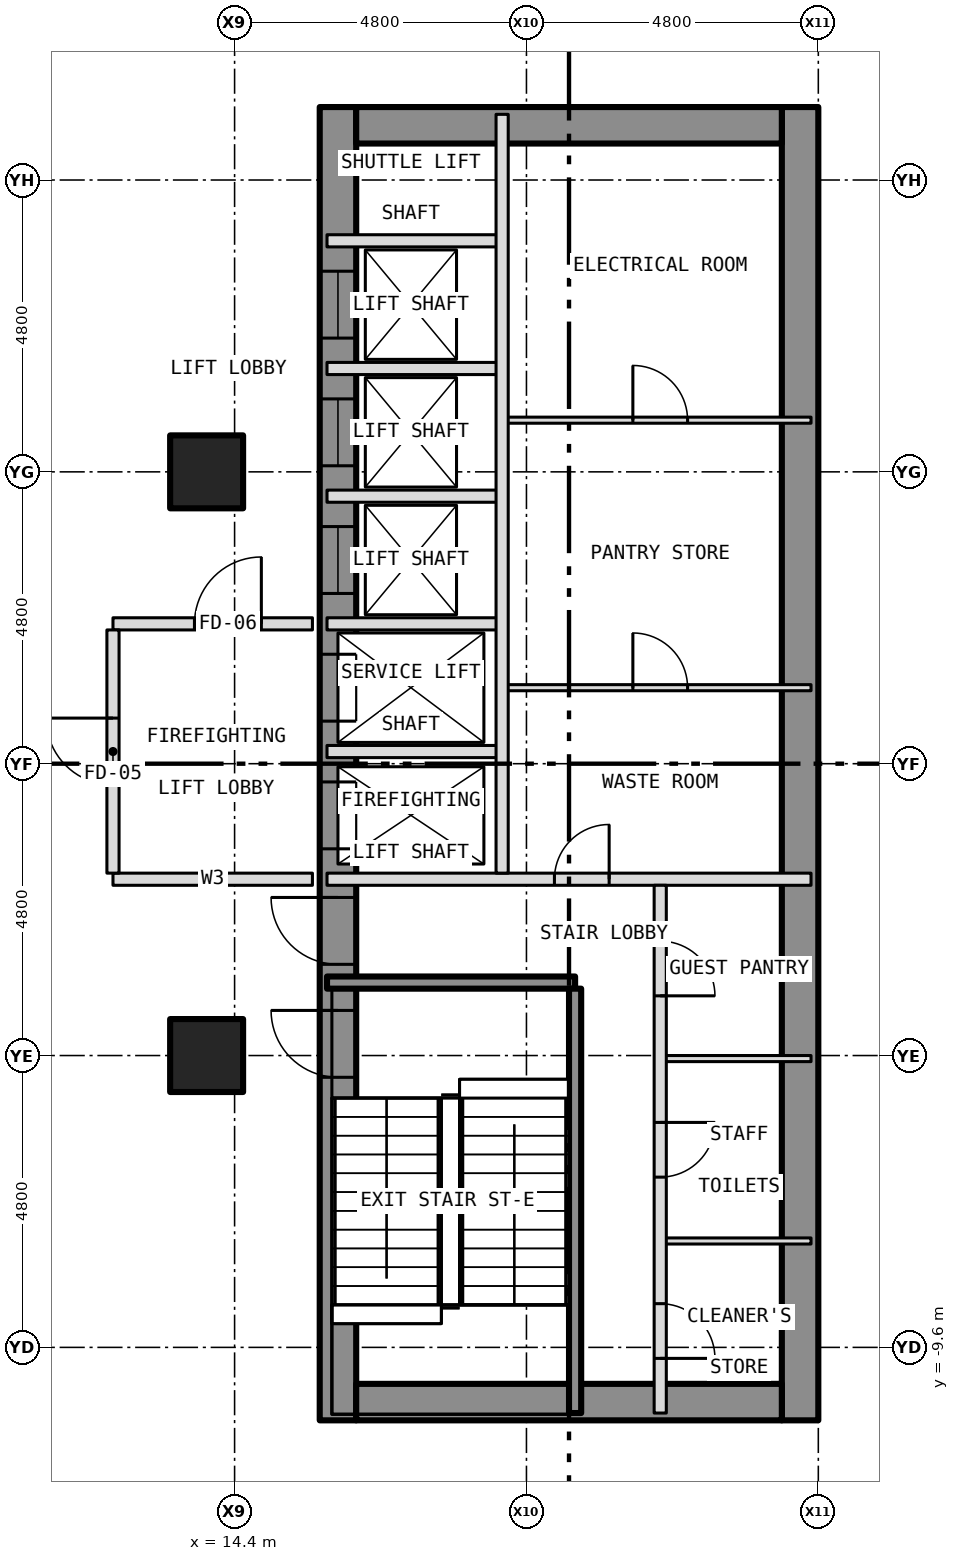
"""IFC4 building model, lengths in metres.
Left out: names, types, materials, properties, quantities, classifications, styles, units other than length and angle.
Written with IfcOpenShell. Run it as: python <this file> out.ifc"""

import sys

from ifc_helpers import new_model, si_unit, direction, frame, frame_2d, origin, origin_2d, place, context, subcontext, project, spatial, rectangle, hollow_rectangle, extrude, element, fill, save


model = new_model("IFC4")
c1 = context("Model", 3, precision=1e-05, world=origin(), true_north=direction((0.0, 1.0)))
c2 = subcontext(c1, "Body", "Model", "MODEL_VIEW")
j1 = project(units=[si_unit("LENGTHUNIT", "METRE"), si_unit("PLANEANGLEUNIT", "RADIAN")], contexts=[c1])
p1 = place(None, origin())
s1 = spatial("IfcSite", under=j1, at=p1, CompositionType="ELEMENT")
p2 = place(p1, origin())
s2 = spatial("IfcBuilding", under=s1, at=p2, CompositionType="ELEMENT")
p3 = place(p2, frame((0.0, 0.0, 7.5)))
s3 = spatial("IfcBuildingStorey", under=s2, at=p3, CompositionType="ELEMENT", Elevation=7.5)
for number, where, z_axis, x_axis in (
    (1, (13.94, -4.8, -0.25), (0.0, 0.0, 1.0), (1.0, 0.0, 0.0)),
    (2, (13.94, 4.8, -0.25), (0.0, 0.0, 1.0), (1.0, 0.0, 0.0)),
):
    element("IfcColumn", number, at=place(p3, frame(where, z_axis=z_axis, x_axis=x_axis)), inside=s3, PredefinedType="COLUMN", context=c2, shape_type="SweptSolid", body=[
        extrude(hollow_rectangle(XDim=1.2, YDim=1.2, WallThickness=0.07, at=origin_2d()), origin(), (0.0, 0.0, 1.0), 8.05),
    ])
p4 = place(p3, frame((16.1, -10.8, 0.0), z_axis=(0.0, 0.0, 1.0), x_axis=(0.0, 1.0, 0.0)))
e3 = element("IfcWall", 3, at=p4, inside=s3, PredefinedType="SHEAR", context=c2, shape_type="SweptSolid", body=[
    extrude(rectangle(XDim=21.6, YDim=0.6, at=frame_2d((10.8, 0.0))), origin(), (0.0, 0.0, 1.0), 7.7),
])
p5 = place(p4, frame((9.4, 0.0, 0.0)))
e4 = element("IfcOpeningElement", 4, at=p5, cuts=e3, PredefinedType="OPENING", context=c2, shape_type="SweptSolid", body=[
    extrude(rectangle(XDim=1.1, YDim=2.1, at=frame_2d((0.55, 1.05))), frame((0.0, 0.312, 0.0), z_axis=(0.0, -1.0, 0.0), x_axis=(1.0, 0.0, 0.0)), (0.0, 0.0, 1.0), 0.624),
])
p6 = place(p4, frame((11.5, 0.0, 0.0)))
e5 = element("IfcOpeningElement", 5, at=p6, cuts=e3, PredefinedType="OPENING", context=c2, shape_type="SweptSolid", body=[
    extrude(rectangle(XDim=1.1, YDim=2.1, at=frame_2d((0.55, 1.05))), frame((0.0, 0.312, 0.0), z_axis=(0.0, -1.0, 0.0), x_axis=(1.0, 0.0, 0.0)), (0.0, 0.0, 1.0), 0.624),
])
p7 = place(p4, frame((13.6, 0.0, 0.0)))
e6 = element("IfcOpeningElement", 6, at=p7, cuts=e3, PredefinedType="OPENING", context=c2, shape_type="SweptSolid", body=[
    extrude(rectangle(XDim=1.1, YDim=2.1, at=frame_2d((0.55, 1.05))), frame((0.0, 0.312, 0.0), z_axis=(0.0, -1.0, 0.0), x_axis=(1.0, 0.0, 0.0)), (0.0, 0.0, 1.0), 0.624),
])
p8 = place(p4, frame((15.7, 0.0, 0.0)))
e7 = element("IfcOpeningElement", 7, at=p8, cuts=e3, PredefinedType="OPENING", context=c2, shape_type="SweptSolid", body=[
    extrude(rectangle(XDim=1.1, YDim=2.1, at=frame_2d((0.55, 1.05))), frame((0.0, 0.312, 0.0), z_axis=(0.0, -1.0, 0.0), x_axis=(1.0, 0.0, 0.0)), (0.0, 0.0, 1.0), 0.624),
])
p9 = place(p4, frame((17.8, 0.0, 0.0)))
e8 = element("IfcOpeningElement", 8, at=p9, cuts=e3, PredefinedType="OPENING", context=c2, shape_type="SweptSolid", body=[
    extrude(rectangle(XDim=1.1, YDim=2.1, at=frame_2d((0.55, 1.05))), frame((0.0, 0.312, 0.0), z_axis=(0.0, -1.0, 0.0), x_axis=(1.0, 0.0, 0.0)), (0.0, 0.0, 1.0), 0.624),
])
p10 = place(p4, frame((5.642, 0.0, 0.0)))
e9 = element("IfcOpeningElement", 9, at=p10, cuts=e3, PredefinedType="OPENING", context=c2, shape_type="SweptSolid", body=[
    extrude(rectangle(XDim=1.1, YDim=2.1, at=frame_2d((0.55, 1.05))), frame((0.0, 0.312, 0.0), z_axis=(0.0, -1.0, 0.0), x_axis=(1.0, 0.0, 0.0)), (0.0, 0.0, 1.0), 0.624),
])
p11 = place(p4, frame((7.5, 0.0, 0.0)))
e10 = element("IfcOpeningElement", 10, at=p11, cuts=e3, PredefinedType="OPENING", context=c2, shape_type="SweptSolid", body=[
    extrude(rectangle(XDim=1.1, YDim=2.1, at=frame_2d((0.55, 1.05))), frame((0.0, 0.312, 0.0), z_axis=(0.0, -1.0, 0.0), x_axis=(1.0, 0.0, 0.0)), (0.0, 0.0, 1.0), 0.624),
])
p12 = place(p3, frame((23.7, -10.8, 0.0), z_axis=(0.0, 0.0, 1.0), x_axis=(0.0, 1.0, 0.0)))
e11 = element("IfcWall", 11, at=p12, inside=s3, PredefinedType="SHEAR", context=c2, shape_type="SweptSolid", body=[
    extrude(rectangle(XDim=21.6, YDim=0.6, at=frame_2d((10.8, 0.0))), origin(), (0.0, 0.0, 1.0), 7.7),
])
for number, where, z_axis, x_axis in (
    (12, (16.4, 10.5, 0.0), (0.0, 0.0, 1.0), (1.0, 0.0, 0.0)),
    (13, (16.4, -10.5, 0.0), (0.0, 0.0, 1.0), (1.0, 0.0, 0.0)),
):
    element("IfcWall", number, at=place(p3, frame(where, z_axis=z_axis, x_axis=x_axis)), inside=s3, PredefinedType="SHEAR", context=c2, shape_type="SweptSolid", body=[
        extrude(rectangle(XDim=7.0, YDim=0.6, at=frame_2d((3.5, 0.0))), origin(), (0.0, 0.0, 1.0), 7.7),
    ])
for number, where, z_axis, x_axis in (
    (14, (21.4, -7.85, 0.0), (0.0, 0.0, 1.0), (1.0, 0.0, 0.0)),
    (15, (21.4, -4.85, 0.0), (0.0, 0.0, 1.0), (1.0, 0.0, 0.0)),
):
    element("IfcWall", number, at=place(p3, frame(where, z_axis=z_axis, x_axis=x_axis)), inside=s3, PredefinedType="PARTITIONING", context=c2, shape_type="SweptSolid", body=[
        extrude(rectangle(XDim=2.48, YDim=0.1, at=frame_2d((1.24, 0.0))), origin(), (0.0, 0.0, 1.0), 7.7),
    ])
p13 = place(p3, frame((15.92, -3.6, 0.0), z_axis=(0.0, 0.0, 1.0), x_axis=(1.0, 0.0, 0.0)))
e16 = element("IfcWall", 16, at=p13, inside=s3, PredefinedType="SHEAR", context=c2, shape_type="SweptSolid", body=[
    extrude(rectangle(XDim=4.08, YDim=0.2, at=frame_2d((2.04, 0.0))), origin(), (0.0, 0.0, 1.0), 7.7),
])
p14 = place(p3, frame((12.4, -1.9, 0.0), z_axis=(0.0, 0.0, 1.0), x_axis=(1.0, 0.0, 0.0)))
e17 = element("IfcWall", 17, at=p14, inside=s3, PredefinedType="PARTITIONING", context=c2, shape_type="SweptSolid", body=[
    extrude(rectangle(XDim=3.28, YDim=0.2, at=frame_2d((1.64, 0.0))), origin(), (0.0, 0.0, 1.0), 7.8),
])
p15 = place(p3, frame((15.92, -1.9, 0.0), z_axis=(0.0, 0.0, 1.0), x_axis=(1.0, 0.0, 0.0)))
e18 = element("IfcWall", 18, at=p15, inside=s3, PredefinedType="PARTITIONING", context=c2, shape_type="SweptSolid", body=[
    extrude(rectangle(XDim=7.96, YDim=0.2, at=frame_2d((3.98, 0.0))), origin(), (0.0, 0.0, 1.0), 7.7),
])
p16 = place(p15, frame((3.74, 0.0, 0.0)))
e19 = element("IfcOpeningElement", 19, at=p16, cuts=e18, PredefinedType="OPENING", context=c2, shape_type="SweptSolid", body=[
    extrude(rectangle(XDim=0.9, YDim=2.1, at=frame_2d((0.45, 1.05))), frame((0.0, 0.112, 0.0), z_axis=(0.0, -1.0, 0.0), x_axis=(1.0, 0.0, 0.0)), (0.0, 0.0, 1.0), 0.224),
])
p17 = place(p3, frame((15.92, 0.2, 0.0), z_axis=(0.0, 0.0, 1.0), x_axis=(1.0, 0.0, 0.0)))
e20 = element("IfcWall", 20, at=p17, inside=s3, PredefinedType="PARTITIONING", context=c2, shape_type="SweptSolid", body=[
    extrude(rectangle(XDim=2.88, YDim=0.2, at=frame_2d((1.44, 0.0))), origin(), (0.0, 0.0, 1.0), 7.7),
])
p18 = place(p3, frame((18.8, 1.25, 0.0), z_axis=(0.0, 0.0, 1.0), x_axis=(1.0, 0.0, 0.0)))
e21 = element("IfcWall", 21, at=p18, inside=s3, PredefinedType="PARTITIONING", context=c2, shape_type="SweptSolid", body=[
    extrude(rectangle(XDim=5.08, YDim=0.1, at=frame_2d((2.54, 0.0))), origin(), (0.0, 0.0, 1.0), 7.7),
])
p19 = place(p18, frame((2.15, 0.0, 0.0)))
e22 = element("IfcOpeningElement", 22, at=p19, cuts=e21, PredefinedType="OPENING", context=c2, shape_type="SweptSolid", body=[
    extrude(rectangle(XDim=0.9, YDim=2.1, at=frame_2d((0.45, 1.05))), frame((0.0, 0.062, 0.0), z_axis=(0.0, -1.0, 0.0), x_axis=(1.0, 0.0, 0.0)), (0.0, 0.0, 1.0), 0.124),
])
p20 = place(p3, frame((12.4, 2.3, 0.0), z_axis=(0.0, 0.0, 1.0), x_axis=(1.0, 0.0, 0.0)))
e23 = element("IfcWall", 23, at=p20, inside=s3, PredefinedType="PARTITIONING", context=c2, shape_type="SweptSolid", body=[
    extrude(rectangle(XDim=3.28, YDim=0.2, at=frame_2d((1.64, 0.0))), origin(), (0.0, 0.0, 1.0), 7.8),
])
p21 = place(p20, frame((1.34, 0.0, 0.0)))
e24 = element("IfcOpeningElement", 24, at=p21, cuts=e23, PredefinedType="OPENING", context=c2, shape_type="SweptSolid", body=[
    extrude(rectangle(XDim=1.1, YDim=2.1, at=frame_2d((0.55, 1.05))), frame((0.0, 0.112, 0.0), z_axis=(0.0, -1.0, 0.0), x_axis=(1.0, 0.0, 0.0)), (0.0, 0.0, 1.0), 0.224),
])
for number, where, z_axis, x_axis in (
    (25, (15.92, 2.3, 0.0), (0.0, 0.0, 1.0), (1.0, 0.0, 0.0)),
    (26, (15.92, 4.4, 0.0), (0.0, 0.0, 1.0), (1.0, 0.0, 0.0)),
):
    element("IfcWall", number, at=place(p3, frame(where, z_axis=z_axis, x_axis=x_axis)), inside=s3, PredefinedType="PARTITIONING", context=c2, shape_type="SweptSolid", body=[
        extrude(rectangle(XDim=2.88, YDim=0.2, at=frame_2d((1.44, 0.0))), origin(), (0.0, 0.0, 1.0), 7.7),
    ])
p22 = place(p3, frame((18.8, 5.65, 0.0), z_axis=(0.0, 0.0, 1.0), x_axis=(1.0, 0.0, 0.0)))
e27 = element("IfcWall", 27, at=p22, inside=s3, PredefinedType="PARTITIONING", context=c2, shape_type="SweptSolid", body=[
    extrude(rectangle(XDim=5.08, YDim=0.1, at=frame_2d((2.54, 0.0))), origin(), (0.0, 0.0, 1.0), 7.7),
])
p23 = place(p22, frame((2.15, 0.0, 0.0)))
e28 = element("IfcOpeningElement", 28, at=p23, cuts=e27, PredefinedType="OPENING", context=c2, shape_type="SweptSolid", body=[
    extrude(rectangle(XDim=0.9, YDim=2.1, at=frame_2d((0.45, 1.05))), frame((0.0, 0.062, 0.0), z_axis=(0.0, -1.0, 0.0), x_axis=(1.0, 0.0, 0.0)), (0.0, 0.0, 1.0), 0.124),
])
for number, where, z_axis, x_axis in (
    (29, (15.92, 6.5, 0.0), (0.0, 0.0, 1.0), (1.0, 0.0, 0.0)),
    (30, (15.92, 8.6, 0.0), (0.0, 0.0, 1.0), (1.0, 0.0, 0.0)),
):
    element("IfcWall", number, at=place(p3, frame(where, z_axis=z_axis, x_axis=x_axis)), inside=s3, PredefinedType="PARTITIONING", context=c2, shape_type="SweptSolid", body=[
        extrude(rectangle(XDim=2.88, YDim=0.2, at=frame_2d((1.44, 0.0))), origin(), (0.0, 0.0, 1.0), 7.7),
    ])
p24 = place(p3, frame((12.4, -1.8, 0.0), z_axis=(0.0, 0.0, 1.0), x_axis=(0.0, 1.0, 0.0)))
e31 = element("IfcWall", 31, at=p24, inside=s3, PredefinedType="PARTITIONING", context=c2, shape_type="SweptSolid", body=[
    extrude(rectangle(XDim=4.0, YDim=0.2, at=frame_2d((2.0, 0.0))), origin(), (0.0, 0.0, 1.0), 7.8),
])
p25 = place(p24, frame((1.45, 0.0, 0.0)))
e32 = element("IfcOpeningElement", 32, at=p25, cuts=e31, PredefinedType="OPENING", context=c2, shape_type="SweptSolid", body=[
    extrude(rectangle(XDim=1.1, YDim=2.1, at=frame_2d((0.55, 1.05))), frame((0.0, 0.112, 0.0), z_axis=(0.0, -1.0, 0.0), x_axis=(1.0, 0.0, 0.0)), (0.0, 0.0, 1.0), 0.224),
])
p26 = place(p3, frame((18.8, -1.8, 0.0), z_axis=(0.0, 0.0, 1.0), x_axis=(0.0, 1.0, 0.0)))
e33 = element("IfcWall", 33, at=p26, inside=s3, PredefinedType="PARTITIONING", context=c2, shape_type="SweptSolid", body=[
    extrude(rectangle(XDim=12.48, YDim=0.2, at=frame_2d((6.24, 0.0))), origin(), (0.0, 0.0, 1.0), 7.7),
])
p27 = place(p3, frame((20.0, -10.68, 0.0), z_axis=(0.0, 0.0, 1.0), x_axis=(0.0, 1.0, 0.0)))
e34 = element("IfcWall", 34, at=p27, inside=s3, PredefinedType="SHEAR", context=c2, shape_type="SweptSolid", body=[
    extrude(rectangle(XDim=6.98, YDim=0.2, at=frame_2d((3.49, 0.0))), origin(), (0.0, 0.0, 1.0), 7.7),
])
p28 = place(p3, frame((21.4, -10.68, 0.0), z_axis=(0.0, 0.0, 1.0), x_axis=(0.0, 1.0, 0.0)))
e35 = element("IfcWall", 35, at=p28, inside=s3, PredefinedType="PARTITIONING", context=c2, shape_type="SweptSolid", body=[
    extrude(rectangle(XDim=8.68, YDim=0.2, at=frame_2d((4.34, 0.0))), origin(), (0.0, 0.0, 1.0), 7.7),
])
p29 = place(p28, frame((0.899, 0.0, 0.0)))
e36 = element("IfcOpeningElement", 36, at=p29, cuts=e35, PredefinedType="OPENING", context=c2, shape_type="SweptSolid", body=[
    extrude(rectangle(XDim=0.9, YDim=2.1, at=frame_2d((0.45, 1.05))), frame((0.0, 0.112, 0.0), z_axis=(0.0, -1.0, 0.0), x_axis=(1.0, 0.0, 0.0)), (0.0, 0.0, 1.0), 0.224),
])
p30 = place(p28, frame((3.88, 0.0, 0.0)))
e37 = element("IfcOpeningElement", 37, at=p30, cuts=e35, PredefinedType="OPENING", context=c2, shape_type="SweptSolid", body=[
    extrude(rectangle(XDim=0.9, YDim=2.1, at=frame_2d((0.45, 1.05))), frame((0.0, 0.112, 0.0), z_axis=(0.0, -1.0, 0.0), x_axis=(1.0, 0.0, 0.0)), (0.0, 0.0, 1.0), 0.224),
])
p31 = place(p28, frame((6.862, 0.0, 0.0)))
e38 = element("IfcOpeningElement", 38, at=p31, cuts=e35, PredefinedType="OPENING", context=c2, shape_type="SweptSolid", body=[
    extrude(rectangle(XDim=0.9, YDim=2.1, at=frame_2d((0.45, 1.05))), frame((0.0, 0.112, 0.0), z_axis=(0.0, -1.0, 0.0), x_axis=(1.0, 0.0, 0.0)), (0.0, 0.0, 1.0), 0.224),
])
p32 = place(p5, origin())
e39 = element("IfcDoor", 39, at=p32, inside=s3, OperationType="SLIDING_TO_LEFT", PredefinedType="DOOR", context=c2, shape_type="SweptSolid", body=[
    extrude(rectangle(XDim=1.1, YDim=2.1, at=frame_2d((0.55, 1.05))), frame((0.0, 0.025, 0.0), z_axis=(0.0, -1.0, 0.0), x_axis=(1.0, 0.0, 0.0)), (0.0, 0.0, 1.0), 0.05),
])
fill(e4, e39)
p33 = place(p6, origin())
e40 = element("IfcDoor", 40, at=p33, inside=s3, OperationType="SLIDING_TO_LEFT", PredefinedType="DOOR", context=c2, shape_type="SweptSolid", body=[
    extrude(rectangle(XDim=1.1, YDim=2.1, at=frame_2d((0.55, 1.05))), frame((0.0, 0.025, 0.0), z_axis=(0.0, -1.0, 0.0), x_axis=(1.0, 0.0, 0.0)), (0.0, 0.0, 1.0), 0.05),
])
fill(e5, e40)
p34 = place(p7, origin())
e41 = element("IfcDoor", 41, at=p34, inside=s3, OperationType="SLIDING_TO_LEFT", PredefinedType="DOOR", context=c2, shape_type="SweptSolid", body=[
    extrude(rectangle(XDim=1.1, YDim=2.1, at=frame_2d((0.55, 1.05))), frame((0.0, 0.025, 0.0), z_axis=(0.0, -1.0, 0.0), x_axis=(1.0, 0.0, 0.0)), (0.0, 0.0, 1.0), 0.05),
])
fill(e6, e41)
p35 = place(p8, origin())
e42 = element("IfcDoor", 42, at=p35, inside=s3, OperationType="SLIDING_TO_LEFT", PredefinedType="DOOR", context=c2, shape_type="SweptSolid", body=[
    extrude(rectangle(XDim=1.1, YDim=2.1, at=frame_2d((0.55, 1.05))), frame((0.0, 0.025, 0.0), z_axis=(0.0, -1.0, 0.0), x_axis=(1.0, 0.0, 0.0)), (0.0, 0.0, 1.0), 0.05),
])
fill(e7, e42)
p36 = place(p9, origin())
e43 = element("IfcDoor", 43, at=p36, inside=s3, OperationType="SLIDING_TO_LEFT", PredefinedType="DOOR", context=c2, shape_type="SweptSolid", body=[
    extrude(rectangle(XDim=1.1, YDim=2.1, at=frame_2d((0.55, 1.05))), frame((0.0, 0.025, 0.0), z_axis=(0.0, -1.0, 0.0), x_axis=(1.0, 0.0, 0.0)), (0.0, 0.0, 1.0), 0.05),
])
fill(e8, e43)
p37 = place(p10, origin())
e44 = element("IfcDoor", 44, at=p37, inside=s3, OperationType="SINGLE_SWING_RIGHT", PredefinedType="DOOR", context=c2, shape_type="SweptSolid", body=[
    extrude(rectangle(XDim=1.1, YDim=2.1, at=frame_2d((0.55, 1.05))), frame((0.0, 0.025, 0.0), z_axis=(0.0, -1.0, 0.0), x_axis=(1.0, 0.0, 0.0)), (0.0, 0.0, 1.0), 0.05),
])
fill(e9, e44)
p38 = place(p11, origin())
e45 = element("IfcDoor", 45, at=p38, inside=s3, OperationType="SINGLE_SWING_RIGHT", PredefinedType="DOOR", context=c2, shape_type="SweptSolid", body=[
    extrude(rectangle(XDim=1.1, YDim=2.1, at=frame_2d((0.55, 1.05))), frame((0.0, 0.025, 0.0), z_axis=(0.0, -1.0, 0.0), x_axis=(1.0, 0.0, 0.0)), (0.0, 0.0, 1.0), 0.05),
])
fill(e10, e45)
p39 = place(p29, origin())
e46 = element("IfcDoor", 46, at=p39, inside=s3, OperationType="SINGLE_SWING_LEFT", PredefinedType="DOOR", context=c2, shape_type="SweptSolid", body=[
    extrude(rectangle(XDim=0.9, YDim=2.1, at=frame_2d((0.45, 1.05))), frame((0.0, 0.025, 0.0), z_axis=(0.0, -1.0, 0.0), x_axis=(1.0, 0.0, 0.0)), (0.0, 0.0, 1.0), 0.05),
])
fill(e36, e46)
p40 = place(p30, origin())
e47 = element("IfcDoor", 47, at=p40, inside=s3, OperationType="SINGLE_SWING_RIGHT", PredefinedType="DOOR", context=c2, shape_type="SweptSolid", body=[
    extrude(rectangle(XDim=0.9, YDim=2.1, at=frame_2d((0.45, 1.05))), frame((0.0, 0.025, 0.0), z_axis=(0.0, -1.0, 0.0), x_axis=(1.0, 0.0, 0.0)), (0.0, 0.0, 1.0), 0.05),
])
fill(e37, e47)
p41 = place(p31, origin())
e48 = element("IfcDoor", 48, at=p41, inside=s3, OperationType="SINGLE_SWING_LEFT", PredefinedType="DOOR", context=c2, shape_type="SweptSolid", body=[
    extrude(rectangle(XDim=0.9, YDim=2.1, at=frame_2d((0.45, 1.05))), frame((0.0, 0.025, 0.0), z_axis=(0.0, -1.0, 0.0), x_axis=(1.0, 0.0, 0.0)), (0.0, 0.0, 1.0), 0.05),
])
fill(e38, e48)
p42 = place(p16, origin())
e49 = element("IfcDoor", 49, at=p42, inside=s3, OperationType="SINGLE_SWING_RIGHT", PredefinedType="DOOR", context=c2, shape_type="SweptSolid", body=[
    extrude(rectangle(XDim=0.9, YDim=2.1, at=frame_2d((0.45, 1.05))), frame((0.0, 0.025, 0.0), z_axis=(0.0, -1.0, 0.0), x_axis=(1.0, 0.0, 0.0)), (0.0, 0.0, 1.0), 0.05),
])
fill(e19, e49)
p43 = place(p19, origin())
e50 = element("IfcDoor", 50, at=p43, inside=s3, OperationType="SINGLE_SWING_LEFT", PredefinedType="DOOR", context=c2, shape_type="SweptSolid", body=[
    extrude(rectangle(XDim=0.9, YDim=2.1, at=frame_2d((0.45, 1.05))), frame((0.0, 0.025, 0.0), z_axis=(0.0, -1.0, 0.0), x_axis=(1.0, 0.0, 0.0)), (0.0, 0.0, 1.0), 0.05),
])
fill(e22, e50)
p44 = place(p23, origin())
e51 = element("IfcDoor", 51, at=p44, inside=s3, OperationType="SINGLE_SWING_LEFT", PredefinedType="DOOR", context=c2, shape_type="SweptSolid", body=[
    extrude(rectangle(XDim=0.9, YDim=2.1, at=frame_2d((0.45, 1.05))), frame((0.0, 0.025, 0.0), z_axis=(0.0, -1.0, 0.0), x_axis=(1.0, 0.0, 0.0)), (0.0, 0.0, 1.0), 0.05),
])
fill(e28, e51)
p45 = place(p25, origin())
e52 = element("IfcDoor", 52, at=p45, inside=s3, OperationType="SINGLE_SWING_RIGHT", PredefinedType="DOOR", context=c2, shape_type="SweptSolid", body=[
    extrude(rectangle(XDim=1.1, YDim=2.1, at=frame_2d((0.55, 1.05))), frame((0.0, 0.025, 0.0), z_axis=(0.0, -1.0, 0.0), x_axis=(1.0, 0.0, 0.0)), (0.0, 0.0, 1.0), 0.05),
])
fill(e32, e52)
p46 = place(p21, origin())
e53 = element("IfcDoor", 53, at=p46, inside=s3, OperationType="SINGLE_SWING_RIGHT", PredefinedType="DOOR", context=c2, shape_type="SweptSolid", body=[
    extrude(rectangle(XDim=1.1, YDim=2.1, at=frame_2d((0.55, 1.05))), frame((0.0, 0.025, 0.0), z_axis=(0.0, -1.0, 0.0), x_axis=(1.0, 0.0, 0.0)), (0.0, 0.0, 1.0), 0.05),
])
fill(e24, e53)
save(model, sys.argv[1])
